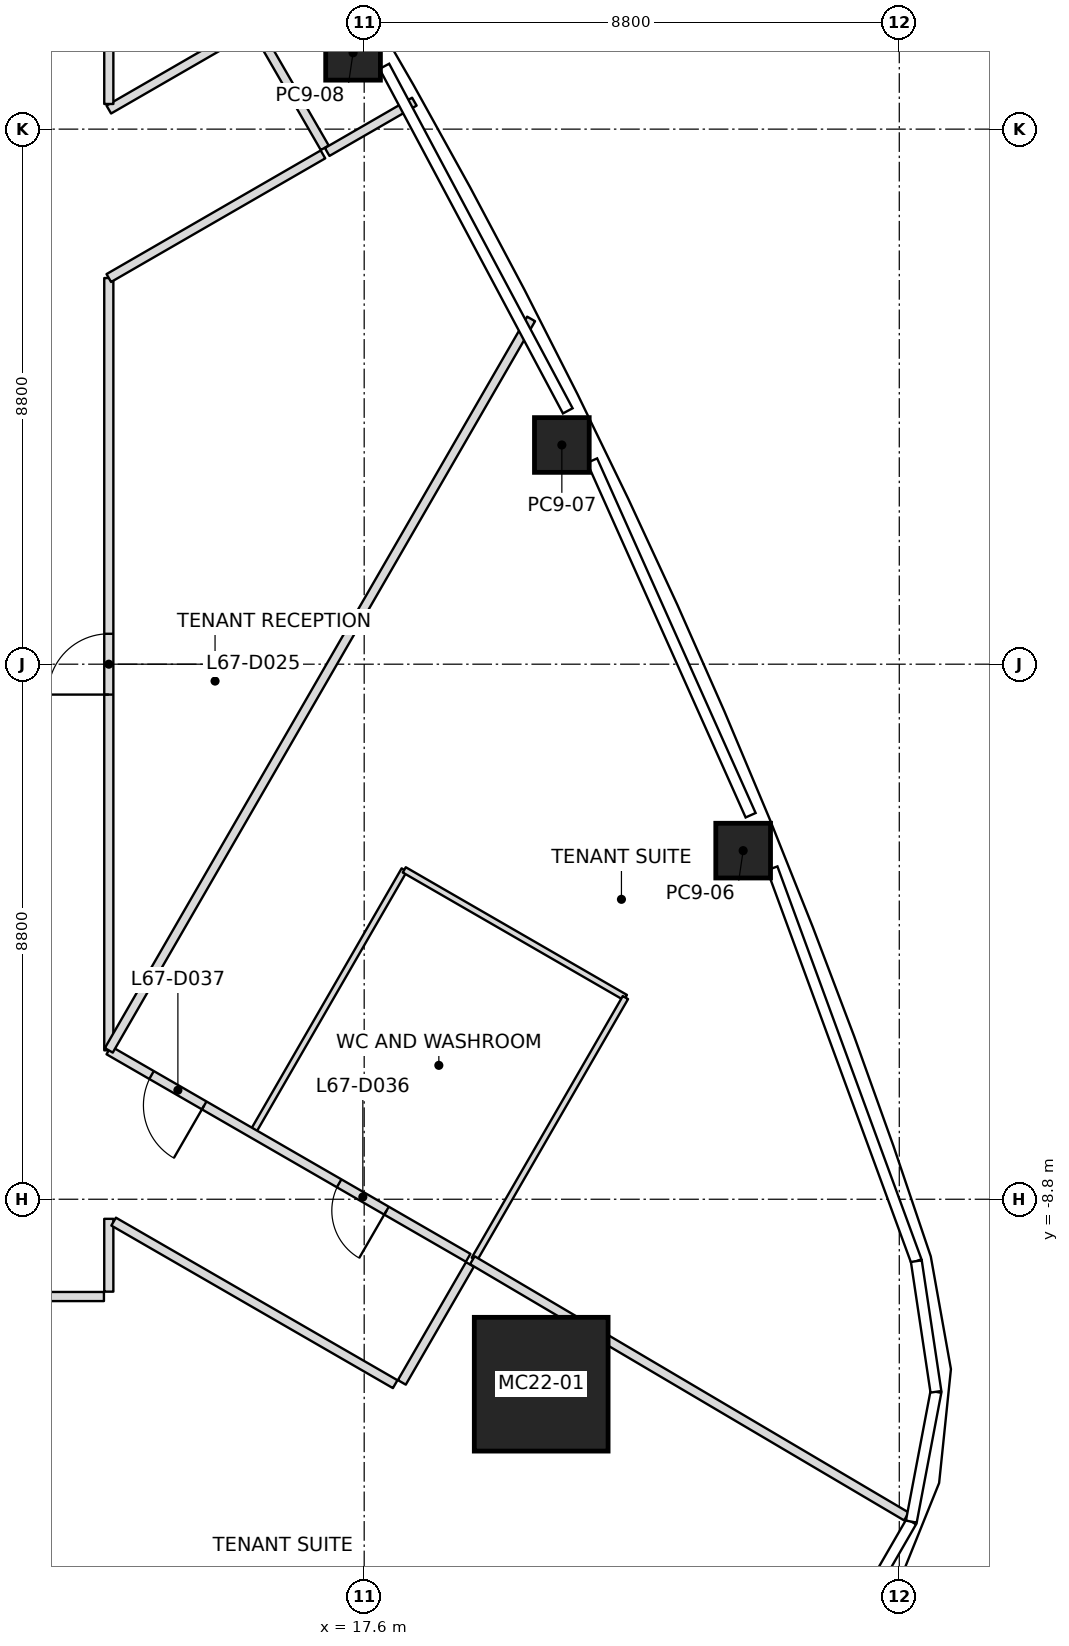
"""IFC4 building model, lengths in metres.
Left out: names, types, materials, properties, quantities, classifications, styles, units other than length and angle.
Written with IfcOpenShell. Run it as: python <this file> out.ifc"""

import sys

from ifc_helpers import new_model, si_unit, direction, frame, frame_2d, origin, origin_2d, place, context, subcontext, project, spatial, rectangle, extrude, element, fill, save


model = new_model("IFC4")
c1 = context("Model", 3, precision=1e-05, world=origin(), true_north=direction((0.0, 1.0)))
c2 = subcontext(c1, "Body", "Model", "MODEL_VIEW")
j1 = project(units=[si_unit("LENGTHUNIT", "METRE"), si_unit("PLANEANGLEUNIT", "RADIAN")], contexts=[c1])
p1 = place(None, origin())
s1 = spatial("IfcSite", under=j1, at=p1, CompositionType="ELEMENT")
p2 = place(p1, origin())
s2 = spatial("IfcBuilding", under=s1, at=p2, CompositionType="ELEMENT")
p3 = place(p2, frame((0.0, 0.0, 295.0)))
s3 = spatial("IfcBuildingStorey", under=s2, at=p3, CompositionType="ELEMENT", Elevation=295.0)
p4 = place(p3, frame((20.511, -11.842, 0.0), z_axis=(-0.027695790401, 0.015983033227, 0.999488612163), x_axis=(0.999616398022, 0.00044283261, 0.027692249912)))
e1 = element("IfcColumn", 1, at=p4, inside=s3, PredefinedType="COLUMN", context=c2, shape_type="SweptSolid", body=[
    extrude(rectangle(XDim=2.2, YDim=2.2, at=origin_2d()), origin(), (0.0, 0.0, 1.0), 4.002),
])
p5 = place(p3, frame((23.833, -3.066, 0.0), z_axis=(-0.017696547774, 0.0099466803, 0.999793926641), x_axis=(-0.376296308492, 0.926363330433, -0.015876657246)))
e2 = element("IfcColumn", 2, at=p5, inside=s3, PredefinedType="COLUMN", context=c2, shape_type="SweptSolid", body=[
    extrude(rectangle(XDim=0.9, YDim=0.9, at=origin_2d()), origin(), (0.0, 0.0, 1.0), 4.001),
])
p6 = place(p3, frame((20.851, 3.605, 0.0), z_axis=(-0.013975659066, 0.001952930525, 0.999900428551), x_axis=(-0.439175149481, 0.89836678962, -0.007892996002)))
e3 = element("IfcColumn", 3, at=p6, inside=s3, PredefinedType="COLUMN", context=c2, shape_type="SweptSolid", body=[
    extrude(rectangle(XDim=0.9, YDim=0.9, at=origin_2d()), origin(), (0.0, 0.0, 1.0), 4.0),
])
p7 = place(p3, frame((17.417, 10.056, 0.0), z_axis=(-0.009887052741, -0.005675900648, 0.999935013058), x_axis=(-0.49997556095, 0.866039512773, -2.7732311e-05)))
e4 = element("IfcColumn", 4, at=p7, inside=s3, PredefinedType="COLUMN", context=c2, shape_type="SweptSolid", body=[
    extrude(rectangle(XDim=0.9, YDim=0.9, at=origin_2d()), origin(), (0.0, 0.0, 1.0), 4.0),
])
p8 = place(p3, frame((20.345, 5.678, 0.0), z_axis=(0.0, 0.0, 1.0), x_axis=(-0.500010513267, -0.866019333862, 0.0)))
e5 = element("IfcWall", 5, at=p8, inside=s3, PredefinedType="PARTITIONING", context=c2, shape_type="SweptSolid", body=[
    extrude(rectangle(XDim=13.89, YDim=0.15, at=frame_2d((6.945, 0.0))), origin(), (0.0, 0.0, 1.0), 3.234),
])
p9 = place(p3, frame((16.991, 8.424, 0.0), z_axis=(0.0, 0.0, 1.0), x_axis=(0.866011236992, 0.500024536802, 0.0)))
e6 = element("IfcWall", 6, at=p9, inside=s3, PredefinedType="PARTITIONING", context=c2, shape_type="SweptSolid", body=[
    extrude(rectangle(XDim=1.656, YDim=0.15, at=frame_2d((0.828, 0.0))), origin(), (0.0, 0.0, 1.0), 3.234),
])
p10 = place(p3, frame((19.379, -9.803, 0.0), z_axis=(0.0, 0.0, 1.0), x_axis=(0.861122287614, -0.508397881364, 0.0)))
e7 = element("IfcWall", 7, at=p10, inside=s3, PredefinedType="PARTITIONING", context=c2, shape_type="SweptSolid", body=[
    extrude(rectangle(XDim=8.29, YDim=0.15, at=frame_2d((4.145, 0.0))), origin(), (0.0, 0.0, 1.0), 3.234),
])
p11 = place(p3, frame((1.2, -10.4, 0.0), z_axis=(0.0, 0.0, 1.0), x_axis=(1.0, 0.0, 0.0)))
e8 = element("IfcWall", 8, at=p11, inside=s3, PredefinedType="PARTITIONING", context=c2, shape_type="SweptSolid", body=[
    extrude(rectangle(XDim=12.12, YDim=0.15, at=frame_2d((6.06, 0.0))), origin(), (0.0, 0.0, 1.0), 3.393),
])
p12 = place(p11, frame((2.05, 0.0, 0.0)))
e9 = element("IfcOpeningElement", 9, at=p12, cuts=e8, PredefinedType="OPENING", context=c2, shape_type="SweptSolid", body=[
    extrude(rectangle(XDim=0.9, YDim=2.1, at=frame_2d((0.45, 1.05))), frame((0.0, 0.075, 0.0), z_axis=(0.0, -1.0, 0.0), x_axis=(1.0, 0.0, 0.0)), (0.0, 0.0, 1.0), 0.15),
])
p13 = place(p11, frame((8.15, 0.0, 0.0)))
e10 = element("IfcOpeningElement", 10, at=p13, cuts=e8, PredefinedType="OPENING", context=c2, shape_type="SweptSolid", body=[
    extrude(rectangle(XDim=1.0, YDim=2.1, at=frame_2d((0.5, 1.05))), frame((0.0, 0.075, 0.0), z_axis=(0.0, -1.0, 0.0), x_axis=(1.0, 0.0, 0.0)), (0.0, 0.0, 1.0), 0.15),
])
p14 = place(p3, frame((13.4, -10.32, 0.0), z_axis=(0.0, 0.0, 1.0), x_axis=(0.0, 1.0, 0.0)))
e11 = element("IfcWall", 11, at=p14, inside=s3, PredefinedType="PARTITIONING", context=c2, shape_type="SweptSolid", body=[
    extrude(rectangle(XDim=1.198, YDim=0.15, at=frame_2d((0.599, 0.0))), origin(), (0.0, 0.0, 1.0), 3.233),
])
p15 = place(p3, frame((13.479, -9.168, 0.0), z_axis=(0.0, 0.0, 1.0), x_axis=(0.866037316941, -0.49997936524, 0.0)))
e12 = element("IfcWall", 12, at=p15, inside=s3, PredefinedType="PARTITIONING", context=c2, shape_type="SweptSolid", body=[
    extrude(rectangle(XDim=5.347, YDim=0.15, at=frame_2d((2.673, 0.0))), origin(), (0.0, 0.0, 1.0), 3.233),
])
p16 = place(p3, frame((13.4, -6.351, 0.0), z_axis=(0.0, 0.0, 1.0), x_axis=(0.0, 1.0, 0.0)))
e13 = element("IfcWall", 13, at=p16, inside=s3, PredefinedType="PARTITIONING", context=c2, shape_type="SweptSolid", body=[
    extrude(rectangle(XDim=12.702, YDim=0.15, at=frame_2d((6.351, 0.0))), origin(), (0.0, 0.0, 1.0), 3.317),
])
p17 = place(p16, frame((5.851, 0.0, 0.0)))
e14 = element("IfcOpeningElement", 14, at=p17, cuts=e13, PredefinedType="OPENING", context=c2, shape_type="SweptSolid", body=[
    extrude(rectangle(XDim=1.0, YDim=2.1, at=frame_2d((0.5, 1.05))), frame((0.0, 0.075, 0.0), z_axis=(0.0, -1.0, 0.0), x_axis=(1.0, 0.0, 0.0)), (0.0, 0.0, 1.0), 0.15),
])
p18 = place(p3, frame((13.4, 6.351, 0.0), z_axis=(0.0, 0.0, 1.0), x_axis=(0.866036641328, 0.499980535498, 0.0)))
e15 = element("IfcWall", 15, at=p18, inside=s3, PredefinedType="PARTITIONING", context=c2, shape_type="SweptSolid", body=[
    extrude(rectangle(XDim=4.067, YDim=0.15, at=frame_2d((2.034, 0.0))), origin(), (0.0, 0.0, 1.0), 3.45),
])
p19 = place(p3, frame((19.31, -9.763, 0.0), z_axis=(0.0, 0.0, 1.0), x_axis=(-0.866024132967, 0.500002201113, 0.0)))
e16 = element("IfcWall", 16, at=p19, inside=s3, PredefinedType="PARTITIONING", context=c2, shape_type="SweptSolid", body=[
    extrude(rectangle(XDim=6.824, YDim=0.15, at=frame_2d((3.412, 0.0))), origin(), (0.0, 0.0, 1.0), 3.317),
])
p20 = place(p19, frame((1.55, 0.0, 0.0)))
e17 = element("IfcOpeningElement", 17, at=p20, cuts=e16, PredefinedType="OPENING", context=c2, shape_type="SweptSolid", body=[
    extrude(rectangle(XDim=0.9, YDim=2.1, at=frame_2d((0.45, 1.05))), frame((0.0, 0.075, 0.0), z_axis=(0.0, -1.0, 0.0), x_axis=(1.0, 0.0, 0.0)), (0.0, 0.0, 1.0), 0.15),
])
p21 = place(p19, frame((5.012, 0.0, 0.0)))
e18 = element("IfcOpeningElement", 18, at=p21, cuts=e16, PredefinedType="OPENING", context=c2, shape_type="SweptSolid", body=[
    extrude(rectangle(XDim=1.0, YDim=2.1, at=frame_2d((0.5, 1.05))), frame((0.0, 0.075, 0.0), z_axis=(0.0, -1.0, 0.0), x_axis=(1.0, 0.0, 0.0)), (0.0, 0.0, 1.0), 0.15),
])
p22 = place(p3, frame((15.722, 10.463, 0.0), z_axis=(0.0, 0.0, 1.0), x_axis=(-0.866015774862, -0.500016677412, 0.0)))
e19 = element("IfcWall", 19, at=p22, inside=s3, PredefinedType="PARTITIONING", context=c2, shape_type="SweptSolid", body=[
    extrude(rectangle(XDim=2.682, YDim=0.15, at=frame_2d((1.341, 0.0))), origin(), (0.0, 0.0, 1.0), 3.45),
])
p23 = place(p3, frame((13.4, 9.214, 0.0), z_axis=(0.0, 0.0, 1.0), x_axis=(0.0, 1.0, 0.0)))
e20 = element("IfcWall", 20, at=p23, inside=s3, PredefinedType="PARTITIONING", context=c2, shape_type="SweptSolid", body=[
    extrude(rectangle(XDim=1.106, YDim=0.15, at=frame_2d((0.553, 0.0))), origin(), (0.0, 0.0, 1.0), 3.45),
])
p24 = place(p3, frame((16.951, 8.494, 0.0), z_axis=(0.0, 0.0, 1.0), x_axis=(-0.500030632641, 0.866007717299, 0.0)))
e21 = element("IfcWall", 21, at=p24, inside=s3, PredefinedType="PARTITIONING", context=c2, shape_type="SweptSolid", body=[
    extrude(rectangle(XDim=2.24, YDim=0.15, at=frame_2d((1.12, 0.0))), origin(), (0.0, 0.0, 1.0), 3.45),
])
p25 = place(p3, frame((18.219, -11.812, 0.0), z_axis=(0.0, 0.0, 1.0), x_axis=(0.500030632641, 0.866007717299, 0.0)))
e22 = element("IfcWall", 22, at=p25, inside=s3, PredefinedType="PARTITIONING", context=c2, shape_type="SweptSolid", body=[
    extrude(rectangle(XDim=2.24, YDim=0.15, at=frame_2d((1.12, 0.0))), origin(), (0.0, 0.0, 1.0), 3.233),
])
p26 = place(p3, frame((15.774, -7.687, 0.0), z_axis=(0.0, 0.0, 1.0), x_axis=(0.499974753747, 0.866039979225, 0.0)))
e23 = element("IfcWall", 23, at=p26, inside=s3, PredefinedType="PARTITIONING", context=c2, shape_type="SweptSolid", body=[
    extrude(rectangle(XDim=4.97, YDim=0.1, at=frame_2d((2.485, 0.0))), origin(), (0.0, 0.0, 1.0), 3.317),
])
p27 = place(p3, frame((18.259, -3.383, 0.0), z_axis=(0.0, 0.0, 1.0), x_axis=(0.866049104564, -0.499958946799, 0.0)))
e24 = element("IfcWall", 24, at=p27, inside=s3, PredefinedType="PARTITIONING", context=c2, shape_type="SweptSolid", body=[
    extrude(rectangle(XDim=4.2, YDim=0.1, at=frame_2d((2.1, 0.0))), origin(), (0.0, 0.0, 1.0), 3.317),
])
p28 = place(p3, frame((21.896, -5.483, 0.0), z_axis=(0.0, 0.0, 1.0), x_axis=(-0.500011595943, -0.86601870876, 0.0)))
e25 = element("IfcWall", 25, at=p28, inside=s3, PredefinedType="PARTITIONING", context=c2, shape_type="SweptSolid", body=[
    extrude(rectangle(XDim=4.97, YDim=0.1, at=frame_2d((2.485, 0.0))), origin(), (0.0, 0.0, 1.0), 3.443),
])
p29 = place(p17, origin())
e26 = element("IfcDoor", 26, at=p29, inside=s3, OperationType="SINGLE_SWING_RIGHT", PredefinedType="DOOR", context=c2, shape_type="SweptSolid", body=[
    extrude(rectangle(XDim=1.0, YDim=2.1, at=frame_2d((0.5, 1.05))), frame((0.0, 0.025, 0.0), z_axis=(0.0, -1.0, 0.0), x_axis=(1.0, 0.0, 0.0)), (0.0, 0.0, 1.0), 0.05),
])
fill(e14, e26)
p30 = place(p20, origin())
e27 = element("IfcDoor", 27, at=p30, inside=s3, OperationType="SINGLE_SWING_RIGHT", PredefinedType="DOOR", context=c2, shape_type="SweptSolid", body=[
    extrude(rectangle(XDim=0.9, YDim=2.1, at=frame_2d((0.45, 1.05))), frame((0.0, 0.025, 0.0), z_axis=(0.0, -1.0, 0.0), x_axis=(1.0, 0.0, 0.0)), (0.0, 0.0, 1.0), 0.05),
])
fill(e17, e27)
p31 = place(p21, origin())
e28 = element("IfcDoor", 28, at=p31, inside=s3, OperationType="SINGLE_SWING_LEFT", PredefinedType="DOOR", context=c2, shape_type="SweptSolid", body=[
    extrude(rectangle(XDim=1.0, YDim=2.1, at=frame_2d((0.5, 1.05))), frame((0.0, 0.025, 0.0), z_axis=(0.0, -1.0, 0.0), x_axis=(1.0, 0.0, 0.0)), (0.0, 0.0, 1.0), 0.05),
])
fill(e18, e28)
save(model, sys.argv[1])
